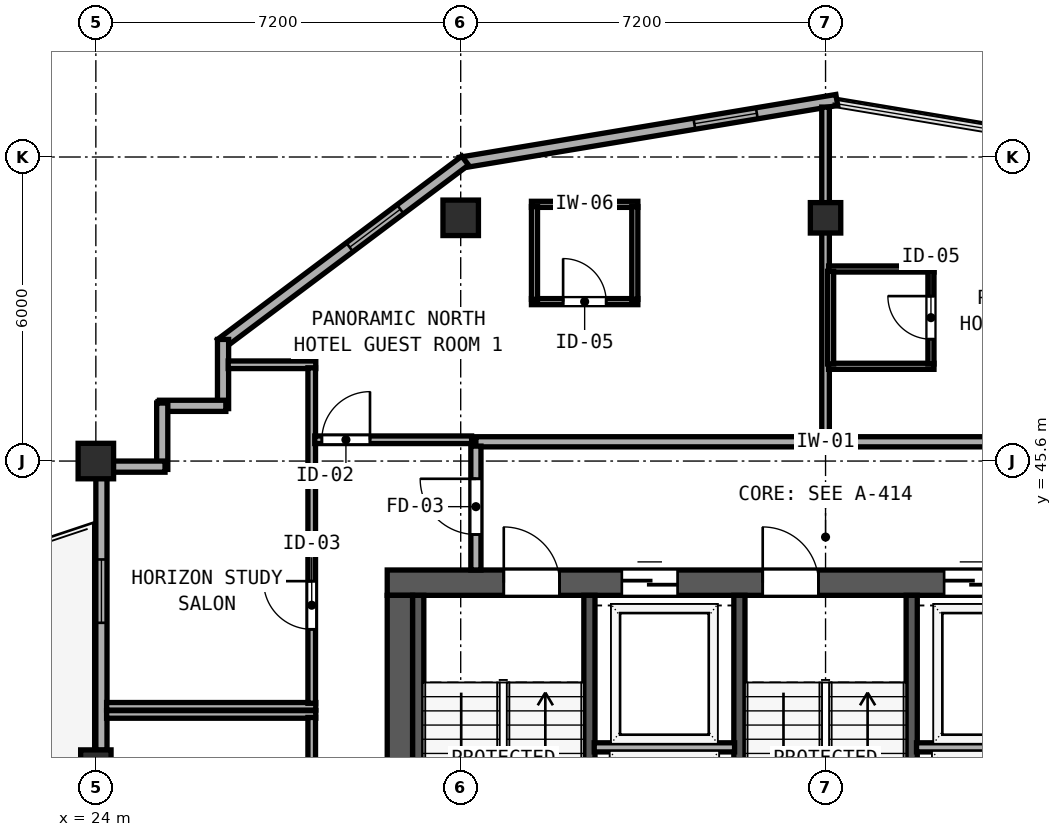
"""IFC4 building model, lengths in metres.
Left out: names, types, materials, properties, quantities, classifications, styles, units other than length and angle.
Written with IfcOpenShell. Run it as: python <this file> out.ifc"""

import sys

from ifc_helpers import new_model, si_unit, direction, frame, frame_2d, origin, origin_2d, place, context, subcontext, project, spatial, rectangle, hollow_rectangle, extrude, element, fill, save


model = new_model("IFC4")
c1 = context("Model", 3, precision=1e-05, world=origin(), true_north=direction((0.0, 1.0)))
c2 = subcontext(c1, "Body", "Model", "MODEL_VIEW")
j1 = project(units=[si_unit("LENGTHUNIT", "METRE"), si_unit("PLANEANGLEUNIT", "RADIAN")], contexts=[c1])
p1 = place(None, origin())
s1 = spatial("IfcSite", under=j1, at=p1, CompositionType="ELEMENT")
p2 = place(p1, origin())
s2 = spatial("IfcBuilding", under=s1, at=p2, CompositionType="ELEMENT")
p3 = place(p2, frame((0.0, 0.0, 282.2)))
s3 = spatial("IfcBuildingStorey", under=s2, at=p3, CompositionType="ELEMENT", Elevation=282.2)
p4 = place(p3, frame((29.75, 43.2, 0.0), z_axis=(0.0, 0.0, 1.0), x_axis=(1.0, 0.0, 0.0)))
e1 = element("IfcWall", 1, at=p4, inside=s3, PredefinedType="SHEAR", context=c2, shape_type="SweptSolid", body=[
    extrude(rectangle(XDim=17.3, YDim=0.5, at=frame_2d((8.65, 0.0))), origin(), (0.0, 0.0, 1.0), 3.72),
])
p5 = place(p4, frame((2.3, 0.0, 0.0)))
e2 = element("IfcOpeningElement", 2, at=p5, cuts=e1, PredefinedType="OPENING", context=c2, shape_type="SweptSolid", body=[
    extrude(rectangle(XDim=1.1, YDim=2.15, at=frame_2d((0.55, 1.075))), frame((0.0, 0.26, 0.0), z_axis=(0.0, -1.0, 0.0), x_axis=(1.0, 0.0, 0.0)), (0.0, 0.0, 1.0), 0.52),
])
p6 = place(p4, frame((7.41, 0.0, 0.0)))
e3 = element("IfcOpeningElement", 3, at=p6, cuts=e1, PredefinedType="OPENING", context=c2, shape_type="SweptSolid", body=[
    extrude(rectangle(XDim=1.1, YDim=2.15, at=frame_2d((0.55, 1.075))), frame((0.0, 0.26, 0.0), z_axis=(0.0, -1.0, 0.0), x_axis=(1.0, 0.0, 0.0)), (0.0, 0.0, 1.0), 0.52),
])
p7 = place(p4, frame((13.5, 0.0, 0.0)))
e4 = element("IfcOpeningElement", 4, at=p7, cuts=e1, PredefinedType="OPENING", context=c2, shape_type="SweptSolid", body=[
    extrude(rectangle(XDim=1.1, YDim=2.15, at=frame_2d((0.55, 1.075))), frame((0.0, 0.26, 0.0), z_axis=(0.0, -1.0, 0.0), x_axis=(1.0, 0.0, 0.0)), (0.0, 0.0, 1.0), 0.52),
])
p8 = place(p4, frame((4.63, 0.0, 0.0)))
e5 = element("IfcOpeningElement", 5, at=p8, cuts=e1, PredefinedType="OPENING", context=c2, shape_type="SweptSolid", body=[
    extrude(rectangle(XDim=1.1, YDim=2.2, at=frame_2d((0.55, 1.1))), frame((0.0, 0.26, 0.0), z_axis=(0.0, -1.0, 0.0), x_axis=(1.0, 0.0, 0.0)), (0.0, 0.0, 1.0), 0.52),
])
p9 = place(p4, frame((10.99, 0.0, 0.0)))
e6 = element("IfcOpeningElement", 6, at=p9, cuts=e1, PredefinedType="OPENING", context=c2, shape_type="SweptSolid", body=[
    extrude(rectangle(XDim=1.1, YDim=2.2, at=frame_2d((0.55, 1.1))), frame((0.0, 0.26, 0.0), z_axis=(0.0, -1.0, 0.0), x_axis=(1.0, 0.0, 0.0)), (0.0, 0.0, 1.0), 0.52),
])
p10 = place(p3, frame((30.0, 32.8, 0.0), z_axis=(0.0, 0.0, 1.0), x_axis=(0.0, 1.0, 0.0)))
e7 = element("IfcWall", 7, at=p10, inside=s3, PredefinedType="SHEAR", context=c2, shape_type="SweptSolid", body=[
    extrude(rectangle(XDim=10.15, YDim=0.5, at=frame_2d((5.075, 0.0))), origin(), (0.0, 0.0, 1.0), 3.72),
])
for number, where, z_axis, x_axis in (
    (8, (30.362, 35.39, 0.0), (0.0, 0.0, 1.0), (0.0, 1.0, 0.0)),
    (9, (33.74, 35.39, 0.0), (0.0, 0.0, 1.0), (0.0, 1.0, 0.0)),
    (10, (36.7, 35.39, 0.0), (0.0, 0.0, 1.0), (0.0, 1.0, 0.0)),
    (11, (40.1, 35.39, 0.0), (0.0, 0.0, 1.0), (0.0, 1.0, 0.0)),
):
    element("IfcWall", number, at=place(p3, frame(where, z_axis=z_axis, x_axis=x_axis)), inside=s3, PredefinedType="SHEAR", context=c2, shape_type="SweptSolid", body=[
        extrude(rectangle(XDim=7.56, YDim=0.22, at=frame_2d((3.78, 0.0))), origin(), (0.0, 0.0, 1.0), 3.72),
    ])
for number, where, z_axis, x_axis in (
    (12, (24.0, 45.6, 0.0), (0.0, 0.0, 1.0), (1.0, 0.0, 0.0)),
    (13, (31.2, 50.4, 0.0), (0.0, 0.0, 1.0), (1.0, 0.0, 0.0)),
):
    element("IfcColumn", number, at=place(p3, frame(where, z_axis=z_axis, x_axis=x_axis)), inside=s3, PredefinedType="COLUMN", context=c2, shape_type="SweptSolid", body=[
        extrude(hollow_rectangle(XDim=0.7, YDim=0.7, WallThickness=0.026, at=origin_2d()), origin(), (0.0, 0.0, 1.0), 3.9),
    ])
for number, where, z_axis, x_axis in (
    (14, (24.0, 39.6, 0.0), (0.0, 0.0, 1.0), (1.0, 0.0, 0.0)),
    (15, (38.4, 50.4, 0.0), (0.0, 0.0, 1.0), (1.0, 0.0, 0.0)),
):
    element("IfcColumn", number, at=place(p3, frame(where, z_axis=z_axis, x_axis=x_axis)), inside=s3, PredefinedType="COLUMN", context=c2, shape_type="SweptSolid", body=[
        extrude(hollow_rectangle(XDim=0.6, YDim=0.6, WallThickness=0.024, at=origin_2d()), origin(), (0.0, 0.0, 1.0), 3.9),
    ])
p11 = place(p3, frame((38.622, 52.726, 0.0), z_axis=(0.0, 0.0, 1.0), x_axis=(-0.986390420428, -0.164420006349, 0.0)))
e16 = element("IfcWall", 16, at=p11, inside=s3, PredefinedType="SOLIDWALL", context=c2, shape_type="SweptSolid", body=[
    extrude(rectangle(XDim=7.534, YDim=0.22, at=frame_2d((3.767, 0.0))), origin(), (0.0, 0.0, 1.0), 3.72),
])
p12 = place(p11, frame((1.6, 0.0, 0.85)))
e17 = element("IfcOpeningElement", 17, at=p12, cuts=e16, PredefinedType="OPENING", context=c2, shape_type="SweptSolid", body=[
    extrude(rectangle(XDim=1.25, YDim=1.95, at=frame_2d((0.625, 0.975))), frame((0.0, 0.12, 0.0), z_axis=(0.0, -1.0, 0.0), x_axis=(1.0, 0.0, 0.0)), (0.0, 0.0, 1.0), 0.24),
])
p13 = place(p3, frame((31.289, 51.529, 0.0), z_axis=(0.0, 0.0, 1.0), x_axis=(-0.800014580093, -0.599980559383, 0.0)))
e18 = element("IfcWall", 18, at=p13, inside=s3, PredefinedType="SOLIDWALL", context=c2, shape_type="SweptSolid", body=[
    extrude(rectangle(XDim=6.028, YDim=0.22, at=frame_2d((3.014, 0.0))), origin(), (0.0, 0.0, 1.0), 3.72),
])
p14 = place(p13, frame((1.6, 0.0, 0.85)))
e19 = element("IfcOpeningElement", 19, at=p14, cuts=e18, PredefinedType="OPENING", context=c2, shape_type="SweptSolid", body=[
    extrude(rectangle(XDim=1.25, YDim=1.95, at=frame_2d((0.625, 0.975))), frame((0.0, 0.12, 0.0), z_axis=(0.0, -1.0, 0.0), x_axis=(1.0, 0.0, 0.0)), (0.0, 0.0, 1.0), 0.24),
])
p15 = place(p3, frame((26.51, 48.0, 0.0), z_axis=(0.0, 0.0, 1.0), x_axis=(0.0, -1.0, 0.0)))
e20 = element("IfcWall", 20, at=p15, inside=s3, PredefinedType="SOLIDWALL", context=c2, shape_type="SweptSolid", body=[
    extrude(rectangle(XDim=1.365, YDim=0.22, at=frame_2d((0.683, 0.0))), origin(), (0.0, 0.0, 1.0), 3.72),
])
for number, where, z_axis, x_axis in (
    (21, (26.565, 46.69, 0.0), (0.0, 0.0, 1.0), (-1.0, 0.0, 0.0)),
    (22, (25.31, 46.745, 0.0), (0.0, 0.0, 1.0), (0.0, -1.0, 0.0)),
):
    element("IfcWall", number, at=place(p3, frame(where, z_axis=z_axis, x_axis=x_axis)), inside=s3, PredefinedType="SOLIDWALL", context=c2, shape_type="SweptSolid", body=[
        extrude(rectangle(XDim=1.31, YDim=0.22, at=frame_2d((0.655, 0.0))), origin(), (0.0, 0.0, 1.0), 3.72),
    ])
p16 = place(p3, frame((25.365, 45.49, 0.0), z_axis=(0.0, 0.0, 1.0), x_axis=(-1.0, 0.0, 0.0)))
e23 = element("IfcWall", 23, at=p16, inside=s3, PredefinedType="SOLIDWALL", context=c2, shape_type="SweptSolid", body=[
    extrude(rectangle(XDim=1.023, YDim=0.22, at=frame_2d((0.511, 0.0))), origin(), (0.0, 0.0, 1.0), 3.72),
])
p17 = place(p3, frame((24.11, 45.258, 0.0), z_axis=(0.0, 0.0, 1.0), x_axis=(0.0, -1.0, 0.0)))
e24 = element("IfcWall", 24, at=p17, inside=s3, PredefinedType="SOLIDWALL", context=c2, shape_type="SweptSolid", body=[
    extrude(rectangle(XDim=5.366, YDim=0.22, at=frame_2d((2.683, 0.0))), origin(), (0.0, 0.0, 1.0), 3.365),
])
p18 = place(p17, frame((1.6, 0.0, 0.85)))
e25 = element("IfcOpeningElement", 25, at=p18, cuts=e24, PredefinedType="OPENING", context=c2, shape_type="SweptSolid", body=[
    extrude(rectangle(XDim=1.25, YDim=1.95, at=frame_2d((0.625, 0.975))), frame((0.0, 0.12, 0.0), z_axis=(0.0, -1.0, 0.0), x_axis=(1.0, 0.0, 0.0)), (0.0, 0.0, 1.0), 0.24),
])
p19 = place(p3, frame((31.5, 45.98, 0.0), z_axis=(0.0, 0.0, 1.0), x_axis=(1.0, 0.0, 0.0)))
e26 = element("IfcWall", 26, at=p19, inside=s3, PredefinedType="SOLIDWALL", context=c2, shape_type="SweptSolid", body=[
    extrude(rectangle(XDim=13.8, YDim=0.2, at=frame_2d((6.9, 0.0))), origin(), (0.0, 0.0, 1.0), 3.72),
])
p20 = place(p3, frame((31.5, 43.45, 0.0), z_axis=(0.0, 0.0, 1.0), x_axis=(0.0, 1.0, 0.0)))
e27 = element("IfcWall", 27, at=p20, inside=s3, PredefinedType="SOLIDWALL", context=c2, shape_type="SweptSolid", body=[
    extrude(rectangle(XDim=2.445, YDim=0.2, at=frame_2d((1.223, 0.0))), origin(), (0.0, 0.0, 1.0), 3.72),
])
p21 = place(p20, frame((1.8, 0.0, 0.0), z_axis=(0.0, 0.0, 1.0), x_axis=(-1.0, 0.0, 0.0)))
e28 = element("IfcOpeningElement", 28, at=p21, cuts=e27, PredefinedType="OPENING", context=c2, shape_type="SweptSolid", body=[
    extrude(rectangle(XDim=1.1, YDim=2.15, at=frame_2d((0.55, 1.075))), frame((0.0, 0.11, 0.0), z_axis=(0.0, -1.0, 0.0), x_axis=(1.0, 0.0, 0.0)), (0.0, 0.0, 1.0), 0.22),
])
for number, where, z_axis, x_axis in (
    (29, (33.835, 39.95, 0.0), (0.0, 0.0, 1.0), (1.0, 0.0, 0.0)),
    (30, (40.195, 39.95, 0.0), (0.0, 0.0, 1.0), (1.0, 0.0, 0.0)),
):
    element("IfcWall", number, at=place(p3, frame(where, z_axis=z_axis, x_axis=x_axis)), inside=s3, PredefinedType="SOLIDWALL", context=c2, shape_type="SweptSolid", body=[
        extrude(rectangle(XDim=2.77, YDim=0.18, at=frame_2d((1.385, 0.0))), origin(), (0.0, 0.0, 1.0), 3.72),
    ])
p22 = place(p3, frame((24.212, 40.6, 0.0), z_axis=(0.0, 0.0, 1.0), x_axis=(1.0, 0.0, 0.0)))
e31 = element("IfcWall", 31, at=p22, inside=s3, PredefinedType="PARTITIONING", context=c2, shape_type="SweptSolid", body=[
    extrude(rectangle(XDim=4.128, YDim=0.15, at=frame_2d((2.064, 0.0))), origin(), (0.0, 0.0, 1.0), 3.72),
])
p23 = place(p3, frame((28.26, 36.52, 0.0), z_axis=(0.0, 0.0, 1.0), x_axis=(0.0, 1.0, 0.0)))
e32 = element("IfcWall", 32, at=p23, inside=s3, PredefinedType="PARTITIONING", context=c2, shape_type="SweptSolid", body=[
    extrude(rectangle(XDim=4.02, YDim=0.15, at=frame_2d((2.01, 0.0))), origin(), (0.0, 0.0, 1.0), 3.72),
])
p24 = place(p23, frame((2.01, 0.0, 0.0), z_axis=(0.0, 0.0, 1.0), x_axis=(-1.0, 0.0, 0.0)))
e33 = element("IfcOpeningElement", 33, at=p24, cuts=e32, PredefinedType="OPENING", context=c2, shape_type="SweptSolid", body=[
    extrude(rectangle(XDim=0.95, YDim=2.12, at=frame_2d((0.475, 1.06))), frame((0.0, 0.085, 0.0), z_axis=(0.0, -1.0, 0.0), x_axis=(1.0, 0.0, 0.0)), (0.0, 0.0, 1.0), 0.17),
])
p25 = place(p3, frame((26.612, 47.5, 0.0), z_axis=(0.0, 0.0, 1.0), x_axis=(1.0, 0.0, 0.0)))
e34 = element("IfcWall", 34, at=p25, inside=s3, PredefinedType="PARTITIONING", context=c2, shape_type="SweptSolid", body=[
    extrude(rectangle(XDim=1.728, YDim=0.15, at=frame_2d((0.864, 0.0))), origin(), (0.0, 0.0, 1.0), 3.72),
])
p26 = place(p3, frame((24.212, 40.76, 0.0), z_axis=(0.0, 0.0, 1.0), x_axis=(1.0, 0.0, 0.0)))
e35 = element("IfcWall", 35, at=p26, inside=s3, PredefinedType="PARTITIONING", context=c2, shape_type="SweptSolid", body=[
    extrude(rectangle(XDim=4.128, YDim=0.15, at=frame_2d((2.064, 0.0))), origin(), (0.0, 0.0, 1.0), 3.72),
])
p27 = place(p3, frame((28.26, 40.82, 0.0), z_axis=(0.0, 0.0, 1.0), x_axis=(0.0, 1.0, 0.0)))
e36 = element("IfcWall", 36, at=p27, inside=s3, PredefinedType="PARTITIONING", context=c2, shape_type="SweptSolid", body=[
    extrude(rectangle(XDim=6.62, YDim=0.15, at=frame_2d((3.31, 0.0))), origin(), (0.0, 0.0, 1.0), 3.72),
])
p28 = place(p27, frame((2.41, 0.0, 0.0), z_axis=(0.0, 0.0, 1.0), x_axis=(-1.0, 0.0, 0.0)))
e37 = element("IfcOpeningElement", 37, at=p28, cuts=e36, PredefinedType="OPENING", context=c2, shape_type="SweptSolid", body=[
    extrude(rectangle(XDim=0.95, YDim=2.12, at=frame_2d((0.475, 1.06))), frame((0.0, 0.085, 0.0), z_axis=(0.0, -1.0, 0.0), x_axis=(1.0, 0.0, 0.0)), (0.0, 0.0, 1.0), 0.17),
])
p29 = place(p3, frame((28.32, 46.02, 0.0), z_axis=(0.0, 0.0, 1.0), x_axis=(1.0, 0.0, 0.0)))
e38 = element("IfcWall", 38, at=p29, inside=s3, PredefinedType="PARTITIONING", context=c2, shape_type="SweptSolid", body=[
    extrude(rectangle(XDim=3.095, YDim=0.15, at=frame_2d((1.547, 0.0))), origin(), (0.0, 0.0, 1.0), 3.72),
])
p30 = place(p29, frame((0.14, 0.0, 0.0)))
e39 = element("IfcOpeningElement", 39, at=p30, cuts=e38, PredefinedType="OPENING", context=c2, shape_type="SweptSolid", body=[
    extrude(rectangle(XDim=0.95, YDim=2.15, at=frame_2d((0.475, 1.075))), frame((0.0, 0.085, 0.0), z_axis=(0.0, -1.0, 0.0), x_axis=(1.0, 0.0, 0.0)), (0.0, 0.0, 1.0), 0.17),
])
p31 = place(p3, frame((38.4, 46.065, 0.0), z_axis=(0.0, 0.0, 1.0), x_axis=(0.0, 1.0, 0.0)))
e40 = element("IfcWall", 40, at=p31, inside=s3, PredefinedType="PARTITIONING", context=c2, shape_type="SweptSolid", body=[
    extrude(rectangle(XDim=6.52, YDim=0.15, at=frame_2d((3.26, 0.0))), origin(), (0.0, 0.0, 1.0), 3.72),
])
p32 = place(p3, frame((32.596, 50.666, 0.0), z_axis=(0.0, 0.0, 1.0), x_axis=(1.0, 0.0, 0.0)))
e41 = element("IfcWall", 41, at=p32, inside=s3, PredefinedType="PARTITIONING", context=c2, shape_type="SweptSolid", body=[
    extrude(rectangle(XDim=2.1, YDim=0.12, at=frame_2d((1.05, 0.0))), origin(), (0.0, 0.0, 1.0), 3.72),
])
p33 = place(p3, frame((32.596, 48.746, 0.0), z_axis=(0.0, 0.0, 1.0), x_axis=(1.0, 0.0, 0.0)))
e42 = element("IfcWall", 42, at=p33, inside=s3, PredefinedType="PARTITIONING", context=c2, shape_type="SweptSolid", body=[
    extrude(rectangle(XDim=2.1, YDim=0.12, at=frame_2d((1.05, 0.0))), origin(), (0.0, 0.0, 1.0), 3.72),
])
p34 = place(p33, frame((0.625, 0.0, 0.0)))
e43 = element("IfcOpeningElement", 43, at=p34, cuts=e42, PredefinedType="OPENING", context=c2, shape_type="SweptSolid", body=[
    extrude(rectangle(XDim=0.85, YDim=2.1, at=frame_2d((0.425, 1.05))), frame((0.0, 0.07, 0.0), z_axis=(0.0, -1.0, 0.0), x_axis=(1.0, 0.0, 0.0)), (0.0, 0.0, 1.0), 0.14),
])
for number, where, z_axis, x_axis in (
    (44, (32.656, 48.791, 0.0), (0.0, 0.0, 1.0), (0.0, 1.0, 0.0)),
    (45, (34.636, 48.791, 0.0), (0.0, 0.0, 1.0), (0.0, 1.0, 0.0)),
):
    element("IfcWall", number, at=place(p3, frame(where, z_axis=z_axis, x_axis=x_axis)), inside=s3, PredefinedType="PARTITIONING", context=c2, shape_type="SweptSolid", body=[
        extrude(rectangle(XDim=1.83, YDim=0.12, at=frame_2d((0.915, 0.0))), origin(), (0.0, 0.0, 1.0), 3.72),
    ])
for number, where, z_axis, x_axis in (
    (46, (38.46, 49.39, 0.0), (0.0, 0.0, 1.0), (1.0, 0.0, 0.0)),
    (47, (38.46, 47.47, 0.0), (0.0, 0.0, 1.0), (1.0, 0.0, 0.0)),
):
    element("IfcWall", number, at=place(p3, frame(where, z_axis=z_axis, x_axis=x_axis)), inside=s3, PredefinedType="PARTITIONING", context=c2, shape_type="SweptSolid", body=[
        extrude(rectangle(XDim=2.08, YDim=0.12, at=frame_2d((1.04, 0.0))), origin(), (0.0, 0.0, 1.0), 3.72),
    ])
p35 = place(p3, frame((38.5, 47.515, 0.0), z_axis=(0.0, 0.0, 1.0), x_axis=(0.0, 1.0, 0.0)))
e48 = element("IfcWall", 48, at=p35, inside=s3, PredefinedType="PARTITIONING", context=c2, shape_type="SweptSolid", body=[
    extrude(rectangle(XDim=1.83, YDim=0.12, at=frame_2d((0.915, 0.0))), origin(), (0.0, 0.0, 1.0), 3.72),
])
p36 = place(p3, frame((40.48, 47.515, 0.0), z_axis=(0.0, 0.0, 1.0), x_axis=(0.0, 1.0, 0.0)))
e49 = element("IfcWall", 49, at=p36, inside=s3, PredefinedType="PARTITIONING", context=c2, shape_type="SweptSolid", body=[
    extrude(rectangle(XDim=1.83, YDim=0.12, at=frame_2d((0.915, 0.0))), origin(), (0.0, 0.0, 1.0), 3.72),
])
p37 = place(p36, frame((0.49, 0.0, 0.0)))
e50 = element("IfcOpeningElement", 50, at=p37, cuts=e49, PredefinedType="OPENING", context=c2, shape_type="SweptSolid", body=[
    extrude(rectangle(XDim=0.85, YDim=2.1, at=frame_2d((0.425, 1.05))), frame((0.0, 0.07, 0.0), z_axis=(0.0, -1.0, 0.0), x_axis=(1.0, 0.0, 0.0)), (0.0, 0.0, 1.0), 0.14),
])
p38 = place(p12, origin())
e51 = element("IfcWindow", 51, at=p38, inside=s3, PartitioningType="SINGLE_PANEL", PredefinedType="WINDOW", context=c2, shape_type="SweptSolid", body=[
    extrude(rectangle(XDim=1.25, YDim=1.95, at=frame_2d((0.625, 0.975))), frame((0.0, 0.03, 0.0), z_axis=(0.0, -1.0, 0.0), x_axis=(1.0, 0.0, 0.0)), (0.0, 0.0, 1.0), 0.06),
])
fill(e17, e51)
p39 = place(p14, origin())
e52 = element("IfcWindow", 52, at=p39, inside=s3, PartitioningType="SINGLE_PANEL", PredefinedType="WINDOW", context=c2, shape_type="SweptSolid", body=[
    extrude(rectangle(XDim=1.25, YDim=1.95, at=frame_2d((0.625, 0.975))), frame((0.0, 0.03, 0.0), z_axis=(0.0, -1.0, 0.0), x_axis=(1.0, 0.0, 0.0)), (0.0, 0.0, 1.0), 0.06),
])
fill(e19, e52)
p40 = place(p18, origin())
e53 = element("IfcWindow", 53, at=p40, inside=s3, PartitioningType="SINGLE_PANEL", PredefinedType="WINDOW", context=c2, shape_type="SweptSolid", body=[
    extrude(rectangle(XDim=1.25, YDim=1.95, at=frame_2d((0.625, 0.975))), frame((0.0, 0.03, 0.0), z_axis=(0.0, -1.0, 0.0), x_axis=(1.0, 0.0, 0.0)), (0.0, 0.0, 1.0), 0.06),
])
fill(e25, e53)
p41 = place(p5, origin())
e54 = element("IfcDoor", 54, at=p41, inside=s3, OperationType="SINGLE_SWING_LEFT", PredefinedType="DOOR", context=c2, shape_type="SweptSolid", body=[
    extrude(rectangle(XDim=1.1, YDim=2.15, at=frame_2d((0.55, 1.075))), frame((0.0, 0.185, 0.0), z_axis=(0.0, -1.0, 0.0), x_axis=(1.0, 0.0, 0.0)), (0.0, 0.0, 1.0), 0.05),
])
fill(e2, e54)
p42 = place(p6, origin())
e55 = element("IfcDoor", 55, at=p42, inside=s3, OperationType="SINGLE_SWING_LEFT", PredefinedType="DOOR", context=c2, shape_type="SweptSolid", body=[
    extrude(rectangle(XDim=1.1, YDim=2.15, at=frame_2d((0.55, 1.075))), frame((0.0, 0.185, 0.0), z_axis=(0.0, -1.0, 0.0), x_axis=(1.0, 0.0, 0.0)), (0.0, 0.0, 1.0), 0.05),
])
fill(e3, e55)
p43 = place(p21, origin())
e56 = element("IfcDoor", 56, at=p43, inside=s3, OperationType="SINGLE_SWING_LEFT", PredefinedType="DOOR", context=c2, shape_type="SweptSolid", body=[
    extrude(rectangle(XDim=1.1, YDim=2.15, at=frame_2d((0.55, 1.075))), frame((0.0, 0.025, 0.0), z_axis=(0.0, -1.0, 0.0), x_axis=(1.0, 0.0, 0.0)), (0.0, 0.0, 1.0), 0.05),
])
fill(e28, e56)
p44 = place(p8, origin())
e57 = element("IfcDoor", 57, at=p44, inside=s3, OperationType="SLIDING_TO_LEFT", PredefinedType="DOOR", context=c2, shape_type="SweptSolid", body=[
    extrude(rectangle(XDim=1.1, YDim=2.2, at=frame_2d((0.55, 1.1))), frame((0.0, 0.185, 0.0), z_axis=(0.0, -1.0, 0.0), x_axis=(1.0, 0.0, 0.0)), (0.0, 0.0, 1.0), 0.05),
])
fill(e5, e57)
p45 = place(p9, origin())
e58 = element("IfcDoor", 58, at=p45, inside=s3, OperationType="SLIDING_TO_LEFT", PredefinedType="DOOR", context=c2, shape_type="SweptSolid", body=[
    extrude(rectangle(XDim=1.1, YDim=2.2, at=frame_2d((0.55, 1.1))), frame((0.0, 0.185, 0.0), z_axis=(0.0, -1.0, 0.0), x_axis=(1.0, 0.0, 0.0)), (0.0, 0.0, 1.0), 0.05),
])
fill(e6, e58)
p46 = place(p28, origin())
e59 = element("IfcDoor", 59, at=p46, inside=s3, OperationType="SINGLE_SWING_LEFT", PredefinedType="DOOR", context=c2, shape_type="SweptSolid", body=[
    extrude(rectangle(XDim=0.95, YDim=2.12, at=frame_2d((0.475, 1.06))), frame((0.0, 0.025, 0.0), z_axis=(0.0, -1.0, 0.0), x_axis=(1.0, 0.0, 0.0)), (0.0, 0.0, 1.0), 0.05),
])
fill(e37, e59)
p47 = place(p30, origin())
e60 = element("IfcDoor", 60, at=p47, inside=s3, OperationType="SINGLE_SWING_RIGHT", PredefinedType="DOOR", context=c2, shape_type="SweptSolid", body=[
    extrude(rectangle(XDim=0.95, YDim=2.15, at=frame_2d((0.475, 1.075))), frame((0.0, 0.025, 0.0), z_axis=(0.0, -1.0, 0.0), x_axis=(1.0, 0.0, 0.0)), (0.0, 0.0, 1.0), 0.05),
])
fill(e39, e60)
p48 = place(p34, origin())
e61 = element("IfcDoor", 61, at=p48, inside=s3, OperationType="SINGLE_SWING_LEFT", PredefinedType="DOOR", context=c2, shape_type="SweptSolid", body=[
    extrude(rectangle(XDim=0.85, YDim=2.1, at=frame_2d((0.425, 1.05))), frame((0.0, 0.025, 0.0), z_axis=(0.0, -1.0, 0.0), x_axis=(1.0, 0.0, 0.0)), (0.0, 0.0, 1.0), 0.05),
])
fill(e43, e61)
p49 = place(p37, origin())
e62 = element("IfcDoor", 62, at=p49, inside=s3, OperationType="SINGLE_SWING_RIGHT", PredefinedType="DOOR", context=c2, shape_type="SweptSolid", body=[
    extrude(rectangle(XDim=0.85, YDim=2.1, at=frame_2d((0.425, 1.05))), frame((0.0, 0.025, 0.0), z_axis=(0.0, -1.0, 0.0), x_axis=(1.0, 0.0, 0.0)), (0.0, 0.0, 1.0), 0.05),
])
fill(e50, e62)
save(model, sys.argv[1])
